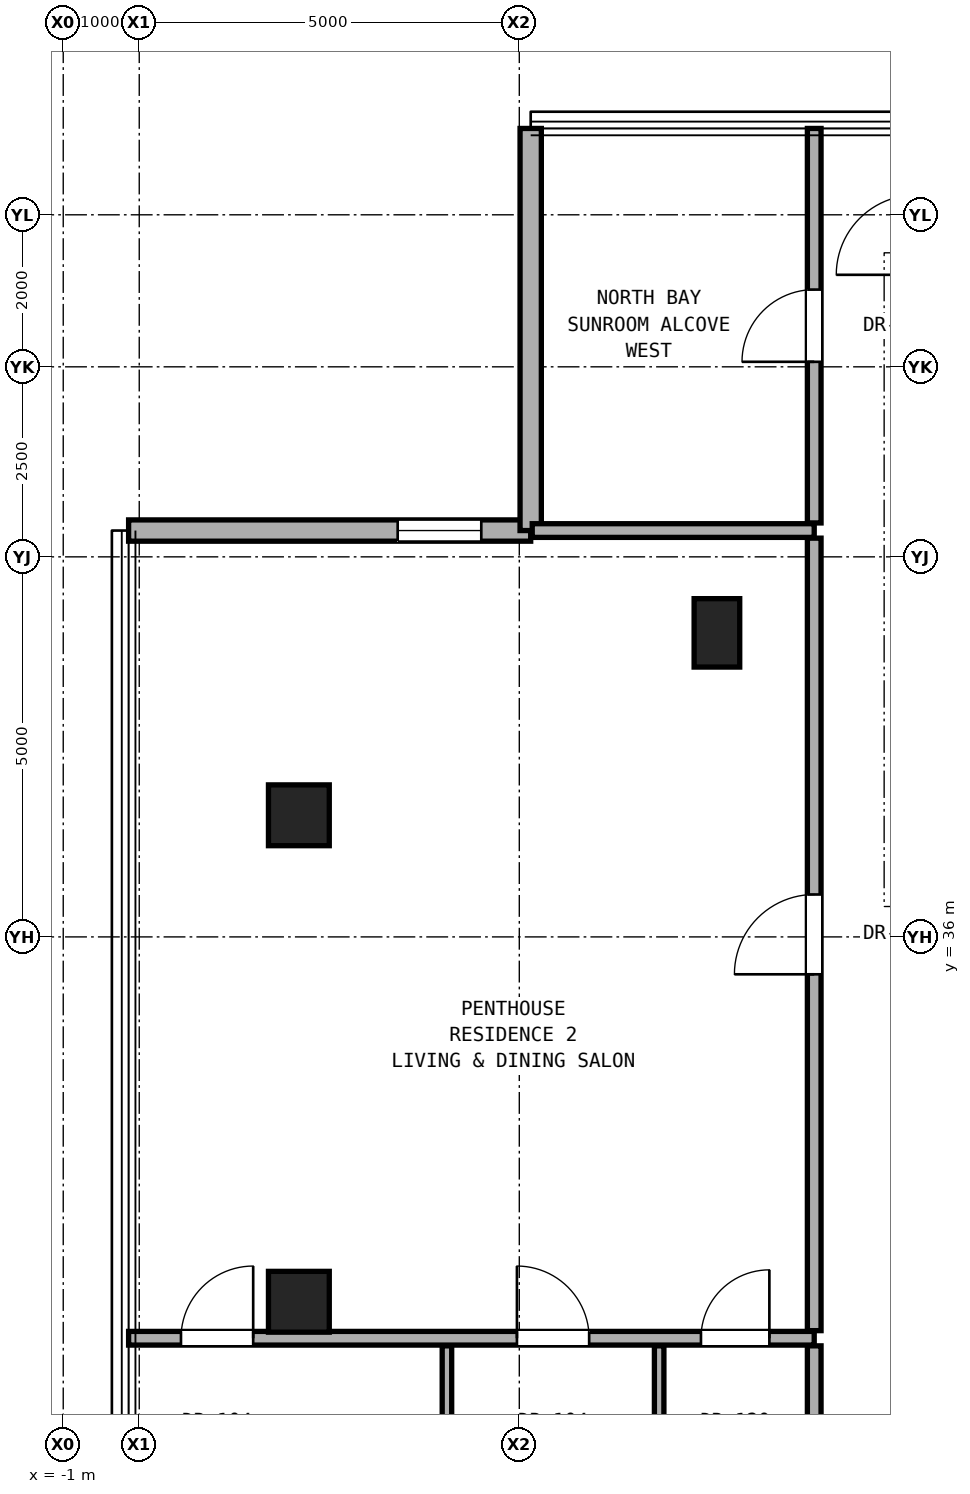
"""IFC4 building model, lengths in metres.
Left out: names, types, materials, properties, quantities, classifications, styles, units other than length and angle.
Written with IfcOpenShell. Run it as: python <this file> out.ifc"""

import sys

from ifc_helpers import new_model, si_unit, direction, frame, frame_2d, origin, origin_2d, place, context, subcontext, project, spatial, rectangle, hollow_rectangle, extrude, element, fill, save


model = new_model("IFC4")
c1 = context("Model", 3, precision=1e-05, world=origin(), true_north=direction((0.0, 1.0)))
c2 = subcontext(c1, "Body", "Model", "MODEL_VIEW")
j1 = project(units=[si_unit("LENGTHUNIT", "METRE"), si_unit("PLANEANGLEUNIT", "RADIAN")], contexts=[c1])
p1 = place(None, origin())
s1 = spatial("IfcSite", under=j1, at=p1, CompositionType="ELEMENT")
p2 = place(p1, origin())
s2 = spatial("IfcBuilding", under=s1, at=p2, CompositionType="ELEMENT")
p3 = place(p2, frame((0.0, 0.0, 226.0)))
s3 = spatial("IfcBuildingStorey", under=s2, at=p3, CompositionType="ELEMENT", Elevation=226.0)
for number, where, z_axis, x_axis in (
    (1, (2.1, 31.2, 0.0), (0.0, 0.0, 1.0), (1.0, 0.0, 0.0)),
    (2, (2.1, 37.6, 0.0), (0.0, 0.0, 1.0), (1.0, 0.0, 0.0)),
):
    element("IfcColumn", number, at=place(p3, frame(where, z_axis=z_axis, x_axis=x_axis)), inside=s3, PredefinedType="COLUMN", context=c2, shape_type="SweptSolid", body=[
        extrude(hollow_rectangle(XDim=0.8, YDim=0.8, WallThickness=0.045, at=origin_2d()), origin(), (0.0, 0.0, 1.0), 3.3),
    ])
p4 = place(p3, frame((7.6, 40.0, 0.0), z_axis=(0.0, 0.0, 1.0), x_axis=(1.0, 0.0, 0.0)))
e3 = element("IfcColumn", 3, at=p4, inside=s3, PredefinedType="PILASTER", context=c2, shape_type="SweptSolid", body=[
    extrude(rectangle(XDim=0.6, YDim=0.9, at=origin_2d()), origin(), (0.0, 0.0, 1.0), 3.3),
])
p5 = place(p3, frame((5.15, 41.346, 0.0), z_axis=(0.0, 0.0, 1.0), x_axis=(-1.0, 0.0, 0.0)))
e4 = element("IfcWall", 4, at=p5, inside=s3, PredefinedType="SOLIDWALL", context=c2, shape_type="SweptSolid", body=[
    extrude(rectangle(XDim=5.29, YDim=0.28, at=frame_2d((2.645, 0.0))), origin(), (0.0, 0.0, 1.0), 3.08),
])
p6 = place(p5, frame((0.65, 0.0, 0.85)))
e5 = element("IfcOpeningElement", 5, at=p6, cuts=e4, PredefinedType="OPENING", context=c2, shape_type="SweptSolid", body=[
    extrude(rectangle(XDim=1.1, YDim=2.0, at=frame_2d((0.55, 1.0))), frame((0.0, 0.15, 0.0), z_axis=(0.0, -1.0, 0.0), x_axis=(1.0, 0.0, 0.0)), (0.0, 0.0, 1.0), 0.3),
])
p7 = place(p3, frame((5.15, 46.636, 0.0), z_axis=(0.0, 0.0, 1.0), x_axis=(0.0, -1.0, 0.0)))
e6 = element("IfcWall", 6, at=p7, inside=s3, PredefinedType="SOLIDWALL", context=c2, shape_type="SweptSolid", body=[
    extrude(rectangle(XDim=5.29, YDim=0.28, at=frame_2d((2.645, 0.0))), origin(), (0.0, 0.0, 1.0), 3.08),
])
p8 = place(p3, frame((-0.14, 30.72, 0.0), z_axis=(0.0, 0.0, 1.0), x_axis=(1.0, 0.0, 0.0)))
e7 = element("IfcWall", 7, at=p8, inside=s3, PredefinedType="PARTITIONING", context=c2, shape_type="SweptSolid", body=[
    extrude(rectangle(XDim=9.02, YDim=0.18, at=frame_2d((4.51, 0.0))), origin(), (0.0, 0.0, 1.0), 2.319),
])
p9 = place(p8, frame((0.689, 0.0, 0.0)))
e8 = element("IfcOpeningElement", 8, at=p9, cuts=e7, PredefinedType="OPENING", context=c2, shape_type="SweptSolid", body=[
    extrude(rectangle(XDim=0.95, YDim=2.15, at=frame_2d((0.475, 1.075))), frame((0.0, 0.1, 0.0), z_axis=(0.0, -1.0, 0.0), x_axis=(1.0, 0.0, 0.0)), (0.0, 0.0, 1.0), 0.2),
])
p10 = place(p8, frame((5.109, 0.0, 0.0)))
e9 = element("IfcOpeningElement", 9, at=p10, cuts=e7, PredefinedType="OPENING", context=c2, shape_type="SweptSolid", body=[
    extrude(rectangle(XDim=0.95, YDim=2.15, at=frame_2d((0.475, 1.075))), frame((0.0, 0.1, 0.0), z_axis=(0.0, -1.0, 0.0), x_axis=(1.0, 0.0, 0.0)), (0.0, 0.0, 1.0), 0.2),
])
p11 = place(p8, frame((7.53, 0.0, 0.0)))
e10 = element("IfcOpeningElement", 10, at=p11, cuts=e7, PredefinedType="OPENING", context=c2, shape_type="SweptSolid", body=[
    extrude(rectangle(XDim=0.9, YDim=2.1, at=frame_2d((0.45, 1.05))), frame((0.0, 0.1, 0.0), z_axis=(0.0, -1.0, 0.0), x_axis=(1.0, 0.0, 0.0)), (0.0, 0.0, 1.0), 0.2),
])
p12 = place(p3, frame((5.17, 41.346, 0.0), z_axis=(0.0, 0.0, 1.0), x_axis=(1.0, 0.0, 0.0)))
e11 = element("IfcWall", 11, at=p12, inside=s3, PredefinedType="PARTITIONING", context=c2, shape_type="SweptSolid", body=[
    extrude(rectangle(XDim=3.71, YDim=0.18, at=frame_2d((1.855, 0.0))), origin(), (0.0, 0.0, 1.0), 3.1),
])
for number, where, z_axis, x_axis in (
    (12, (4.048, 28.073, 0.0), (0.0, 0.0, 1.0), (0.0, 1.0, 0.0)),
    (13, (6.84, 28.073, 0.0), (0.0, 0.0, 1.0), (0.0, 1.0, 0.0)),
):
    element("IfcWall", number, at=place(p3, frame(where, z_axis=z_axis, x_axis=x_axis)), inside=s3, PredefinedType="PARTITIONING", context=c2, shape_type="SweptSolid", body=[
        extrude(rectangle(XDim=2.548, YDim=0.125, at=frame_2d((1.274, 0.0))), origin(), (0.0, 0.0, 1.0), 3.1),
    ])
p13 = place(p3, frame((8.88, 28.073, 0.0), z_axis=(0.0, 0.0, 1.0), x_axis=(0.0, 1.0, 0.0)))
e14 = element("IfcWall", 14, at=p13, inside=s3, PredefinedType="PARTITIONING", context=c2, shape_type="SweptSolid", body=[
    extrude(rectangle(XDim=2.548, YDim=0.18, at=frame_2d((1.274, 0.0))), origin(), (0.0, 0.0, 1.0), 3.1),
])
p14 = place(p3, frame((8.88, 30.82, 0.0), z_axis=(0.0, 0.0, 1.0), x_axis=(0.0, 1.0, 0.0)))
e15 = element("IfcWall", 15, at=p14, inside=s3, PredefinedType="PARTITIONING", context=c2, shape_type="SweptSolid", body=[
    extrude(rectangle(XDim=10.426, YDim=0.18, at=frame_2d((5.213, 0.0))), origin(), (0.0, 0.0, 1.0), 2.396),
])
p15 = place(p14, frame((4.688, 0.0, 0.0)))
e16 = element("IfcOpeningElement", 16, at=p15, cuts=e15, PredefinedType="OPENING", context=c2, shape_type="SweptSolid", body=[
    extrude(rectangle(XDim=1.05, YDim=2.2, at=frame_2d((0.525, 1.1))), frame((0.0, 0.1, 0.0), z_axis=(0.0, -1.0, 0.0), x_axis=(1.0, 0.0, 0.0)), (0.0, 0.0, 1.0), 0.2),
])
p16 = place(p3, frame((8.88, 41.446, 0.0), z_axis=(0.0, 0.0, 1.0), x_axis=(0.0, 1.0, 0.0)))
e17 = element("IfcWall", 17, at=p16, inside=s3, PredefinedType="PARTITIONING", context=c2, shape_type="SweptSolid", body=[
    extrude(rectangle(XDim=5.19, YDim=0.18, at=frame_2d((2.595, 0.0))), origin(), (0.0, 0.0, 1.0), 3.1),
])
p17 = place(p16, frame((2.12, 0.0, 0.0)))
e18 = element("IfcOpeningElement", 18, at=p17, cuts=e17, PredefinedType="OPENING", context=c2, shape_type="SweptSolid", body=[
    extrude(rectangle(XDim=0.95, YDim=2.15, at=frame_2d((0.475, 1.075))), frame((0.0, 0.1, 0.0), z_axis=(0.0, -1.0, 0.0), x_axis=(1.0, 0.0, 0.0)), (0.0, 0.0, 1.0), 0.2),
])
p18 = place(p6, origin())
e19 = element("IfcWindow", 19, at=p18, inside=s3, PartitioningType="SINGLE_PANEL", PredefinedType="WINDOW", context=c2, shape_type="SweptSolid", body=[
    extrude(rectangle(XDim=1.1, YDim=2.0, at=frame_2d((0.55, 1.0))), frame((0.0, 0.03, 0.0), z_axis=(0.0, -1.0, 0.0), x_axis=(1.0, 0.0, 0.0)), (0.0, 0.0, 1.0), 0.06),
])
fill(e5, e19)
p19 = place(p15, origin())
e20 = element("IfcDoor", 20, at=p19, inside=s3, OperationType="SINGLE_SWING_LEFT", PredefinedType="DOOR", context=c2, shape_type="SweptSolid", body=[
    extrude(rectangle(XDim=1.05, YDim=2.2, at=frame_2d((0.525, 1.1))), frame((0.0, 0.025, 0.0), z_axis=(0.0, -1.0, 0.0), x_axis=(1.0, 0.0, 0.0)), (0.0, 0.0, 1.0), 0.05),
])
fill(e16, e20)
p20 = place(p9, origin())
e21 = element("IfcDoor", 21, at=p20, inside=s3, OperationType="SINGLE_SWING_RIGHT", PredefinedType="DOOR", context=c2, shape_type="SweptSolid", body=[
    extrude(rectangle(XDim=0.95, YDim=2.15, at=frame_2d((0.475, 1.075))), frame((0.0, 0.025, 0.0), z_axis=(0.0, -1.0, 0.0), x_axis=(1.0, 0.0, 0.0)), (0.0, 0.0, 1.0), 0.05),
])
fill(e8, e21)
p21 = place(p10, origin())
e22 = element("IfcDoor", 22, at=p21, inside=s3, OperationType="SINGLE_SWING_LEFT", PredefinedType="DOOR", context=c2, shape_type="SweptSolid", body=[
    extrude(rectangle(XDim=0.95, YDim=2.15, at=frame_2d((0.475, 1.075))), frame((0.0, 0.025, 0.0), z_axis=(0.0, -1.0, 0.0), x_axis=(1.0, 0.0, 0.0)), (0.0, 0.0, 1.0), 0.05),
])
fill(e9, e22)
p22 = place(p11, origin())
e23 = element("IfcDoor", 23, at=p22, inside=s3, OperationType="SINGLE_SWING_RIGHT", PredefinedType="DOOR", context=c2, shape_type="SweptSolid", body=[
    extrude(rectangle(XDim=0.9, YDim=2.1, at=frame_2d((0.45, 1.05))), frame((0.0, 0.025, 0.0), z_axis=(0.0, -1.0, 0.0), x_axis=(1.0, 0.0, 0.0)), (0.0, 0.0, 1.0), 0.05),
])
fill(e10, e23)
p23 = place(p17, origin())
e24 = element("IfcDoor", 24, at=p23, inside=s3, OperationType="SINGLE_SWING_LEFT", PredefinedType="DOOR", context=c2, shape_type="SweptSolid", body=[
    extrude(rectangle(XDim=0.95, YDim=2.15, at=frame_2d((0.475, 1.075))), frame((0.0, 0.025, 0.0), z_axis=(0.0, -1.0, 0.0), x_axis=(1.0, 0.0, 0.0)), (0.0, 0.0, 1.0), 0.05),
])
fill(e18, e24)
save(model, sys.argv[1])
